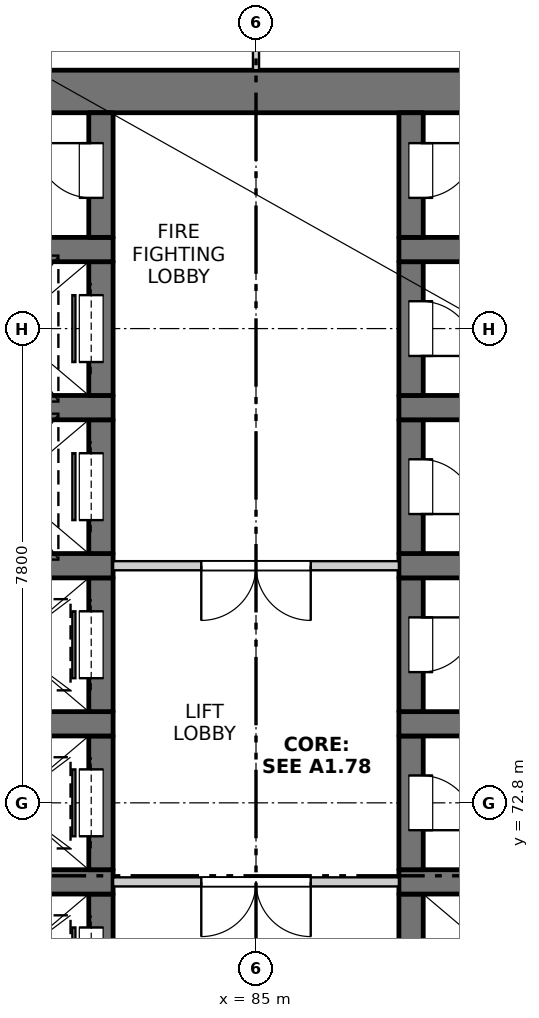
"""IFC4 building model, lengths in metres.
Left out: names, types, materials, properties, quantities, classifications, styles, units other than length and angle.
Written with IfcOpenShell. Run it as: python <this file> out.ifc"""

import sys

from ifc_helpers import new_model, si_unit, direction, frame, frame_2d, origin, place, context, subcontext, project, spatial, rectangle, extrude, element, fill, save


model = new_model("IFC4")
c1 = context("Model", 3, precision=1e-05, world=origin(), true_north=direction((0.0, 1.0)))
c2 = subcontext(c1, "Body", "Model", "MODEL_VIEW")
j1 = project(units=[si_unit("LENGTHUNIT", "METRE"), si_unit("PLANEANGLEUNIT", "RADIAN")], contexts=[c1])
p1 = place(None, origin())
s1 = spatial("IfcSite", under=j1, at=p1, CompositionType="ELEMENT")
p2 = place(p1, origin())
s2 = spatial("IfcBuilding", under=s1, at=p2, CompositionType="ELEMENT")
p3 = place(p2, frame((0.0, 0.0, 58.0)))
s3 = spatial("IfcBuildingStorey", under=s2, at=p3, CompositionType="ELEMENT", Elevation=58.0)
p4 = place(p3, frame((75.6, 84.5, -0.25), z_axis=(0.0, 0.0, 1.0), x_axis=(1.0, 0.0, 0.0)))
e1 = element("IfcWall", 1, at=p4, inside=s3, PredefinedType="SOLIDWALL", context=c2, shape_type="SweptSolid", body=[
    extrude(rectangle(XDim=18.8, YDim=0.7, at=frame_2d((9.4, 0.0))), origin(), (0.0, 0.0, 1.0), 3.4),
])
p5 = place(p3, frame((82.45, 69.1, -0.25), z_axis=(0.0, 0.0, 1.0), x_axis=(0.0, 1.0, 0.0)))
e2 = element("IfcWall", 2, at=p5, inside=s3, PredefinedType="SOLIDWALL", context=c2, shape_type="SweptSolid", body=[
    extrude(rectangle(XDim=2.2, YDim=0.4, at=frame_2d((1.1, 0.0))), origin(), (0.0, 0.0, 1.0), 3.4),
])
p6 = place(p5, frame((0.55, 0.0, 0.25)))
e3 = element("IfcOpeningElement", 3, at=p6, cuts=e2, PredefinedType="OPENING", context=c2, shape_type="SweptSolid", body=[
    extrude(rectangle(XDim=1.1, YDim=2.1, at=frame_2d((0.55, 1.05))), frame((0.0, 0.21, 0.0), z_axis=(0.0, -1.0, 0.0), x_axis=(1.0, 0.0, 0.0)), (0.0, 0.0, 1.0), 0.42),
])
p7 = place(p3, frame((79.65, 71.5, -0.25), z_axis=(0.0, 0.0, 1.0), x_axis=(1.0, 0.0, 0.0)))
e4 = element("IfcWall", 4, at=p7, inside=s3, PredefinedType="SOLIDWALL", context=c2, shape_type="SweptSolid", body=[
    extrude(rectangle(XDim=3.0, YDim=0.4, at=frame_2d((1.5, 0.0))), origin(), (0.0, 0.0, 1.0), 3.4),
])
p8 = place(p3, frame((82.45, 71.7, -0.25), z_axis=(0.0, 0.0, 1.0), x_axis=(0.0, 1.0, 0.0)))
e5 = element("IfcWall", 5, at=p8, inside=s3, PredefinedType="SOLIDWALL", context=c2, shape_type="SweptSolid", body=[
    extrude(rectangle(XDim=2.2, YDim=0.4, at=frame_2d((1.1, 0.0))), origin(), (0.0, 0.0, 1.0), 3.4),
])
p9 = place(p8, frame((0.55, 0.0, 0.25)))
e6 = element("IfcOpeningElement", 6, at=p9, cuts=e5, PredefinedType="OPENING", context=c2, shape_type="SweptSolid", body=[
    extrude(rectangle(XDim=1.1, YDim=2.1, at=frame_2d((0.55, 1.05))), frame((0.0, 0.21, 0.0), z_axis=(0.0, -1.0, 0.0), x_axis=(1.0, 0.0, 0.0)), (0.0, 0.0, 1.0), 0.42),
])
p10 = place(p3, frame((79.65, 74.1, -0.25), z_axis=(0.0, 0.0, 1.0), x_axis=(1.0, 0.0, 0.0)))
e7 = element("IfcWall", 7, at=p10, inside=s3, PredefinedType="SOLIDWALL", context=c2, shape_type="SweptSolid", body=[
    extrude(rectangle(XDim=3.0, YDim=0.4, at=frame_2d((1.5, 0.0))), origin(), (0.0, 0.0, 1.0), 3.4),
])
p11 = place(p3, frame((82.45, 74.3, -0.25), z_axis=(0.0, 0.0, 1.0), x_axis=(0.0, 1.0, 0.0)))
e8 = element("IfcWall", 8, at=p11, inside=s3, PredefinedType="SOLIDWALL", context=c2, shape_type="SweptSolid", body=[
    extrude(rectangle(XDim=2.2, YDim=0.4, at=frame_2d((1.1, 0.0))), origin(), (0.0, 0.0, 1.0), 3.4),
])
p12 = place(p11, frame((0.55, 0.0, 0.25)))
e9 = element("IfcOpeningElement", 9, at=p12, cuts=e8, PredefinedType="OPENING", context=c2, shape_type="SweptSolid", body=[
    extrude(rectangle(XDim=1.1, YDim=2.1, at=frame_2d((0.55, 1.05))), frame((0.0, 0.21, 0.0), z_axis=(0.0, -1.0, 0.0), x_axis=(1.0, 0.0, 0.0)), (0.0, 0.0, 1.0), 0.42),
])
p13 = place(p3, frame((79.65, 76.7, -0.25), z_axis=(0.0, 0.0, 1.0), x_axis=(1.0, 0.0, 0.0)))
e10 = element("IfcWall", 10, at=p13, inside=s3, PredefinedType="SOLIDWALL", context=c2, shape_type="SweptSolid", body=[
    extrude(rectangle(XDim=3.0, YDim=0.4, at=frame_2d((1.5, 0.0))), origin(), (0.0, 0.0, 1.0), 3.4),
])
p14 = place(p3, frame((82.45, 76.9, -0.25), z_axis=(0.0, 0.0, 1.0), x_axis=(0.0, 1.0, 0.0)))
e11 = element("IfcWall", 11, at=p14, inside=s3, PredefinedType="SOLIDWALL", context=c2, shape_type="SweptSolid", body=[
    extrude(rectangle(XDim=2.2, YDim=0.4, at=frame_2d((1.1, 0.0))), origin(), (0.0, 0.0, 1.0), 3.4),
])
p15 = place(p14, frame((0.55, 0.0, 0.25)))
e12 = element("IfcOpeningElement", 12, at=p15, cuts=e11, PredefinedType="OPENING", context=c2, shape_type="SweptSolid", body=[
    extrude(rectangle(XDim=1.1, YDim=2.1, at=frame_2d((0.55, 1.05))), frame((0.0, 0.21, 0.0), z_axis=(0.0, -1.0, 0.0), x_axis=(1.0, 0.0, 0.0)), (0.0, 0.0, 1.0), 0.42),
])
p16 = place(p3, frame((79.65, 79.3, -0.25), z_axis=(0.0, 0.0, 1.0), x_axis=(1.0, 0.0, 0.0)))
e13 = element("IfcWall", 13, at=p16, inside=s3, PredefinedType="SOLIDWALL", context=c2, shape_type="SweptSolid", body=[
    extrude(rectangle(XDim=3.0, YDim=0.4, at=frame_2d((1.5, 0.0))), origin(), (0.0, 0.0, 1.0), 3.4),
])
p17 = place(p3, frame((82.45, 79.5, -0.25), z_axis=(0.0, 0.0, 1.0), x_axis=(0.0, 1.0, 0.0)))
e14 = element("IfcWall", 14, at=p17, inside=s3, PredefinedType="SOLIDWALL", context=c2, shape_type="SweptSolid", body=[
    extrude(rectangle(XDim=2.2, YDim=0.4, at=frame_2d((1.1, 0.0))), origin(), (0.0, 0.0, 1.0), 3.4),
])
p18 = place(p17, frame((0.55, 0.0, 0.25)))
e15 = element("IfcOpeningElement", 15, at=p18, cuts=e14, PredefinedType="OPENING", context=c2, shape_type="SweptSolid", body=[
    extrude(rectangle(XDim=1.1, YDim=2.1, at=frame_2d((0.55, 1.05))), frame((0.0, 0.21, 0.0), z_axis=(0.0, -1.0, 0.0), x_axis=(1.0, 0.0, 0.0)), (0.0, 0.0, 1.0), 0.42),
])
p19 = place(p3, frame((79.65, 81.9, -0.25), z_axis=(0.0, 0.0, 1.0), x_axis=(1.0, 0.0, 0.0)))
e16 = element("IfcWall", 16, at=p19, inside=s3, PredefinedType="SOLIDWALL", context=c2, shape_type="SweptSolid", body=[
    extrude(rectangle(XDim=3.0, YDim=0.4, at=frame_2d((1.5, 0.0))), origin(), (0.0, 0.0, 1.0), 3.4),
])
p20 = place(p3, frame((82.45, 82.1, -0.25), z_axis=(0.0, 0.0, 1.0), x_axis=(0.0, 1.0, 0.0)))
e17 = element("IfcWall", 17, at=p20, inside=s3, PredefinedType="SOLIDWALL", context=c2, shape_type="SweptSolid", body=[
    extrude(rectangle(XDim=2.05, YDim=0.4, at=frame_2d((1.025, 0.0))), origin(), (0.0, 0.0, 1.0), 3.4),
])
p21 = place(p20, frame((0.65, 0.0, 0.25)))
e18 = element("IfcOpeningElement", 18, at=p21, cuts=e17, PredefinedType="OPENING", context=c2, shape_type="SweptSolid", body=[
    extrude(rectangle(XDim=0.9, YDim=2.1, at=frame_2d((0.45, 1.05))), frame((0.0, 0.21, 0.0), z_axis=(0.0, -1.0, 0.0), x_axis=(1.0, 0.0, 0.0)), (0.0, 0.0, 1.0), 0.42),
])
p22 = place(p3, frame((87.55, 69.1, -0.25), z_axis=(0.0, 0.0, 1.0), x_axis=(0.0, 1.0, 0.0)))
e19 = element("IfcWall", 19, at=p22, inside=s3, PredefinedType="SOLIDWALL", context=c2, shape_type="SweptSolid", body=[
    extrude(rectangle(XDim=2.2, YDim=0.4, at=frame_2d((1.1, 0.0))), origin(), (0.0, 0.0, 1.0), 3.4),
])
p23 = place(p3, frame((87.35, 71.5, -0.25), z_axis=(0.0, 0.0, 1.0), x_axis=(1.0, 0.0, 0.0)))
e20 = element("IfcWall", 20, at=p23, inside=s3, PredefinedType="SOLIDWALL", context=c2, shape_type="SweptSolid", body=[
    extrude(rectangle(XDim=3.0, YDim=0.4, at=frame_2d((1.5, 0.0))), origin(), (0.0, 0.0, 1.0), 3.4),
])
p24 = place(p3, frame((87.55, 71.7, -0.25), z_axis=(0.0, 0.0, 1.0), x_axis=(0.0, 1.0, 0.0)))
e21 = element("IfcWall", 21, at=p24, inside=s3, PredefinedType="SOLIDWALL", context=c2, shape_type="SweptSolid", body=[
    extrude(rectangle(XDim=2.2, YDim=0.4, at=frame_2d((1.1, 0.0))), origin(), (0.0, 0.0, 1.0), 3.4),
])
p25 = place(p24, frame((0.65, 0.0, 0.25)))
e22 = element("IfcOpeningElement", 22, at=p25, cuts=e21, PredefinedType="OPENING", context=c2, shape_type="SweptSolid", body=[
    extrude(rectangle(XDim=0.9, YDim=2.1, at=frame_2d((0.45, 1.05))), frame((0.0, 0.21, 0.0), z_axis=(0.0, -1.0, 0.0), x_axis=(1.0, 0.0, 0.0)), (0.0, 0.0, 1.0), 0.42),
])
p26 = place(p3, frame((87.35, 74.1, -0.25), z_axis=(0.0, 0.0, 1.0), x_axis=(1.0, 0.0, 0.0)))
e23 = element("IfcWall", 23, at=p26, inside=s3, PredefinedType="SOLIDWALL", context=c2, shape_type="SweptSolid", body=[
    extrude(rectangle(XDim=3.0, YDim=0.4, at=frame_2d((1.5, 0.0))), origin(), (0.0, 0.0, 1.0), 3.4),
])
p27 = place(p3, frame((87.55, 74.3, -0.25), z_axis=(0.0, 0.0, 1.0), x_axis=(0.0, 1.0, 0.0)))
e24 = element("IfcWall", 24, at=p27, inside=s3, PredefinedType="SOLIDWALL", context=c2, shape_type="SweptSolid", body=[
    extrude(rectangle(XDim=2.2, YDim=0.4, at=frame_2d((1.1, 0.0))), origin(), (0.0, 0.0, 1.0), 3.4),
])
p28 = place(p27, frame((0.65, 0.0, 0.25)))
e25 = element("IfcOpeningElement", 25, at=p28, cuts=e24, PredefinedType="OPENING", context=c2, shape_type="SweptSolid", body=[
    extrude(rectangle(XDim=0.9, YDim=2.1, at=frame_2d((0.45, 1.05))), frame((0.0, 0.21, 0.0), z_axis=(0.0, -1.0, 0.0), x_axis=(1.0, 0.0, 0.0)), (0.0, 0.0, 1.0), 0.42),
])
p29 = place(p3, frame((87.35, 76.7, -0.25), z_axis=(0.0, 0.0, 1.0), x_axis=(1.0, 0.0, 0.0)))
e26 = element("IfcWall", 26, at=p29, inside=s3, PredefinedType="SOLIDWALL", context=c2, shape_type="SweptSolid", body=[
    extrude(rectangle(XDim=3.0, YDim=0.4, at=frame_2d((1.5, 0.0))), origin(), (0.0, 0.0, 1.0), 3.4),
])
p30 = place(p3, frame((87.55, 76.9, -0.25), z_axis=(0.0, 0.0, 1.0), x_axis=(0.0, 1.0, 0.0)))
e27 = element("IfcWall", 27, at=p30, inside=s3, PredefinedType="SOLIDWALL", context=c2, shape_type="SweptSolid", body=[
    extrude(rectangle(XDim=2.2, YDim=0.4, at=frame_2d((1.1, 0.0))), origin(), (0.0, 0.0, 1.0), 3.4),
])
p31 = place(p30, frame((0.65, 0.0, 0.25)))
e28 = element("IfcOpeningElement", 28, at=p31, cuts=e27, PredefinedType="OPENING", context=c2, shape_type="SweptSolid", body=[
    extrude(rectangle(XDim=0.9, YDim=2.1, at=frame_2d((0.45, 1.05))), frame((0.0, 0.21, 0.0), z_axis=(0.0, -1.0, 0.0), x_axis=(1.0, 0.0, 0.0)), (0.0, 0.0, 1.0), 0.42),
])
p32 = place(p3, frame((87.35, 79.3, -0.25), z_axis=(0.0, 0.0, 1.0), x_axis=(1.0, 0.0, 0.0)))
e29 = element("IfcWall", 29, at=p32, inside=s3, PredefinedType="SOLIDWALL", context=c2, shape_type="SweptSolid", body=[
    extrude(rectangle(XDim=3.0, YDim=0.4, at=frame_2d((1.5, 0.0))), origin(), (0.0, 0.0, 1.0), 3.4),
])
p33 = place(p3, frame((87.55, 79.5, -0.25), z_axis=(0.0, 0.0, 1.0), x_axis=(0.0, 1.0, 0.0)))
e30 = element("IfcWall", 30, at=p33, inside=s3, PredefinedType="SOLIDWALL", context=c2, shape_type="SweptSolid", body=[
    extrude(rectangle(XDim=2.2, YDim=0.4, at=frame_2d((1.1, 0.0))), origin(), (0.0, 0.0, 1.0), 3.4),
])
p34 = place(p33, frame((0.65, 0.0, 0.25)))
e31 = element("IfcOpeningElement", 31, at=p34, cuts=e30, PredefinedType="OPENING", context=c2, shape_type="SweptSolid", body=[
    extrude(rectangle(XDim=0.9, YDim=2.1, at=frame_2d((0.45, 1.05))), frame((0.0, 0.21, 0.0), z_axis=(0.0, -1.0, 0.0), x_axis=(1.0, 0.0, 0.0)), (0.0, 0.0, 1.0), 0.42),
])
p35 = place(p3, frame((87.35, 81.9, -0.25), z_axis=(0.0, 0.0, 1.0), x_axis=(1.0, 0.0, 0.0)))
e32 = element("IfcWall", 32, at=p35, inside=s3, PredefinedType="SOLIDWALL", context=c2, shape_type="SweptSolid", body=[
    extrude(rectangle(XDim=3.0, YDim=0.4, at=frame_2d((1.5, 0.0))), origin(), (0.0, 0.0, 1.0), 3.4),
])
p36 = place(p3, frame((87.55, 82.1, -0.25), z_axis=(0.0, 0.0, 1.0), x_axis=(0.0, 1.0, 0.0)))
e33 = element("IfcWall", 33, at=p36, inside=s3, PredefinedType="SOLIDWALL", context=c2, shape_type="SweptSolid", body=[
    extrude(rectangle(XDim=2.05, YDim=0.4, at=frame_2d((1.025, 0.0))), origin(), (0.0, 0.0, 1.0), 3.4),
])
p37 = place(p36, frame((0.65, 0.0, 0.25)))
e34 = element("IfcOpeningElement", 34, at=p37, cuts=e33, PredefinedType="OPENING", context=c2, shape_type="SweptSolid", body=[
    extrude(rectangle(XDim=0.9, YDim=2.1, at=frame_2d((0.45, 1.05))), frame((0.0, 0.21, 0.0), z_axis=(0.0, -1.0, 0.0), x_axis=(1.0, 0.0, 0.0)), (0.0, 0.0, 1.0), 0.42),
])
p38 = place(p3, frame((82.65, 71.5, 0.0), z_axis=(0.0, 0.0, 1.0), x_axis=(1.0, 0.0, 0.0)))
e35 = element("IfcWall", 35, at=p38, inside=s3, PredefinedType="PARTITIONING", context=c2, shape_type="SweptSolid", body=[
    extrude(rectangle(XDim=4.7, YDim=0.15, at=frame_2d((2.35, 0.0))), origin(), (0.0, 0.0, 1.0), 3.15),
])
p39 = place(p38, frame((1.45, 0.0, 0.0)))
e36 = element("IfcOpeningElement", 36, at=p39, cuts=e35, PredefinedType="OPENING", context=c2, shape_type="SweptSolid", body=[
    extrude(rectangle(XDim=1.8, YDim=2.1, at=frame_2d((0.9, 1.05))), frame((0.0, 0.085, 0.0), z_axis=(0.0, -1.0, 0.0), x_axis=(1.0, 0.0, 0.0)), (0.0, 0.0, 1.0), 0.17),
])
p40 = place(p3, frame((82.65, 76.7, 0.0), z_axis=(0.0, 0.0, 1.0), x_axis=(1.0, 0.0, 0.0)))
e37 = element("IfcWall", 37, at=p40, inside=s3, PredefinedType="PARTITIONING", context=c2, shape_type="SweptSolid", body=[
    extrude(rectangle(XDim=4.7, YDim=0.15, at=frame_2d((2.35, 0.0))), origin(), (0.0, 0.0, 1.0), 3.15),
])
p41 = place(p40, frame((1.45, 0.0, 0.0)))
e38 = element("IfcOpeningElement", 38, at=p41, cuts=e37, PredefinedType="OPENING", context=c2, shape_type="SweptSolid", body=[
    extrude(rectangle(XDim=1.8, YDim=2.1, at=frame_2d((0.9, 1.05))), frame((0.0, 0.085, 0.0), z_axis=(0.0, -1.0, 0.0), x_axis=(1.0, 0.0, 0.0)), (0.0, 0.0, 1.0), 0.17),
])
p42 = place(p3, frame((85.0, 84.85, 0.0), z_axis=(0.0, 0.0, 1.0), x_axis=(0.0, 1.0, 0.0)))
e39 = element("IfcWall", 39, at=p42, inside=s3, PredefinedType="PARTITIONING", context=c2, shape_type="SweptSolid", body=[
    extrude(rectangle(XDim=3.25, YDim=0.1, at=frame_2d((1.625, 0.0))), origin(), (0.0, 0.0, 1.0), 3.15),
])
p43 = place(p42, frame((1.15, 0.0, 0.0)))
e40 = element("IfcOpeningElement", 40, at=p43, cuts=e39, PredefinedType="OPENING", context=c2, shape_type="SweptSolid", body=[
    extrude(rectangle(XDim=0.9, YDim=2.1, at=frame_2d((0.45, 1.05))), frame((0.0, 0.06, 0.0), z_axis=(0.0, -1.0, 0.0), x_axis=(1.0, 0.0, 0.0)), (0.0, 0.0, 1.0), 0.12),
])
p44 = place(p6, origin())
e41 = element("IfcDoor", 41, at=p44, inside=s3, OperationType="SLIDING_TO_LEFT", PredefinedType="DOOR", context=c2, shape_type="SweptSolid", body=[
    extrude(rectangle(XDim=1.1, YDim=2.1, at=frame_2d((0.55, 1.05))), frame((0.0, 0.185, 0.0), z_axis=(0.0, -1.0, 0.0), x_axis=(1.0, 0.0, 0.0)), (0.0, 0.0, 1.0), 0.05),
])
fill(e3, e41)
p45 = place(p39, origin())
e42 = element("IfcDoor", 42, at=p45, inside=s3, OperationType="DOUBLE_DOOR_SINGLE_SWING", PredefinedType="DOOR", context=c2, shape_type="SweptSolid", body=[
    extrude(rectangle(XDim=1.8, YDim=2.1, at=frame_2d((0.9, 1.05))), frame((0.0, 0.025, 0.0), z_axis=(0.0, -1.0, 0.0), x_axis=(1.0, 0.0, 0.0)), (0.0, 0.0, 1.0), 0.05),
])
fill(e36, e42)
p46 = place(p9, origin())
e43 = element("IfcDoor", 43, at=p46, inside=s3, OperationType="SLIDING_TO_LEFT", PredefinedType="DOOR", context=c2, shape_type="SweptSolid", body=[
    extrude(rectangle(XDim=1.1, YDim=2.1, at=frame_2d((0.55, 1.05))), frame((0.0, 0.185, 0.0), z_axis=(0.0, -1.0, 0.0), x_axis=(1.0, 0.0, 0.0)), (0.0, 0.0, 1.0), 0.05),
])
fill(e6, e43)
p47 = place(p25, origin())
e44 = element("IfcDoor", 44, at=p47, inside=s3, OperationType="SINGLE_SWING_RIGHT", PredefinedType="DOOR", context=c2, shape_type="SweptSolid", body=[
    extrude(rectangle(XDim=0.9, YDim=2.1, at=frame_2d((0.45, 1.05))), frame((0.0, -0.135, 0.0), z_axis=(0.0, -1.0, 0.0), x_axis=(1.0, 0.0, 0.0)), (0.0, 0.0, 1.0), 0.05),
])
fill(e22, e44)
p48 = place(p12, origin())
e45 = element("IfcDoor", 45, at=p48, inside=s3, OperationType="SLIDING_TO_LEFT", PredefinedType="DOOR", context=c2, shape_type="SweptSolid", body=[
    extrude(rectangle(XDim=1.1, YDim=2.1, at=frame_2d((0.55, 1.05))), frame((0.0, 0.185, 0.0), z_axis=(0.0, -1.0, 0.0), x_axis=(1.0, 0.0, 0.0)), (0.0, 0.0, 1.0), 0.05),
])
fill(e9, e45)
p49 = place(p28, origin())
e46 = element("IfcDoor", 46, at=p49, inside=s3, OperationType="SINGLE_SWING_LEFT", PredefinedType="DOOR", context=c2, shape_type="SweptSolid", body=[
    extrude(rectangle(XDim=0.9, YDim=2.1, at=frame_2d((0.45, 1.05))), frame((0.0, -0.135, 0.0), z_axis=(0.0, -1.0, 0.0), x_axis=(1.0, 0.0, 0.0)), (0.0, 0.0, 1.0), 0.05),
])
fill(e25, e46)
p50 = place(p41, origin())
e47 = element("IfcDoor", 47, at=p50, inside=s3, OperationType="DOUBLE_DOOR_SINGLE_SWING", PredefinedType="DOOR", context=c2, shape_type="SweptSolid", body=[
    extrude(rectangle(XDim=1.8, YDim=2.1, at=frame_2d((0.9, 1.05))), frame((0.0, 0.025, 0.0), z_axis=(0.0, -1.0, 0.0), x_axis=(1.0, 0.0, 0.0)), (0.0, 0.0, 1.0), 0.05),
])
fill(e38, e47)
p51 = place(p15, origin())
e48 = element("IfcDoor", 48, at=p51, inside=s3, OperationType="SLIDING_TO_LEFT", PredefinedType="DOOR", context=c2, shape_type="SweptSolid", body=[
    extrude(rectangle(XDim=1.1, YDim=2.1, at=frame_2d((0.55, 1.05))), frame((0.0, 0.185, 0.0), z_axis=(0.0, -1.0, 0.0), x_axis=(1.0, 0.0, 0.0)), (0.0, 0.0, 1.0), 0.05),
])
fill(e12, e48)
p52 = place(p31, origin())
e49 = element("IfcDoor", 49, at=p52, inside=s3, OperationType="SINGLE_SWING_RIGHT", PredefinedType="DOOR", context=c2, shape_type="SweptSolid", body=[
    extrude(rectangle(XDim=0.9, YDim=2.1, at=frame_2d((0.45, 1.05))), frame((0.0, -0.135, 0.0), z_axis=(0.0, -1.0, 0.0), x_axis=(1.0, 0.0, 0.0)), (0.0, 0.0, 1.0), 0.05),
])
fill(e28, e49)
p53 = place(p18, origin())
e50 = element("IfcDoor", 50, at=p53, inside=s3, OperationType="SLIDING_TO_LEFT", PredefinedType="DOOR", context=c2, shape_type="SweptSolid", body=[
    extrude(rectangle(XDim=1.1, YDim=2.1, at=frame_2d((0.55, 1.05))), frame((0.0, 0.185, 0.0), z_axis=(0.0, -1.0, 0.0), x_axis=(1.0, 0.0, 0.0)), (0.0, 0.0, 1.0), 0.05),
])
fill(e15, e50)
p54 = place(p34, origin())
e51 = element("IfcDoor", 51, at=p54, inside=s3, OperationType="SINGLE_SWING_RIGHT", PredefinedType="DOOR", context=c2, shape_type="SweptSolid", body=[
    extrude(rectangle(XDim=0.9, YDim=2.1, at=frame_2d((0.45, 1.05))), frame((0.0, -0.135, 0.0), z_axis=(0.0, -1.0, 0.0), x_axis=(1.0, 0.0, 0.0)), (0.0, 0.0, 1.0), 0.05),
])
fill(e31, e51)
p55 = place(p21, origin())
e52 = element("IfcDoor", 52, at=p55, inside=s3, OperationType="SINGLE_SWING_RIGHT", PredefinedType="DOOR", context=c2, shape_type="SweptSolid", body=[
    extrude(rectangle(XDim=0.9, YDim=2.1, at=frame_2d((0.45, 1.05))), frame((0.0, 0.185, 0.0), z_axis=(0.0, -1.0, 0.0), x_axis=(1.0, 0.0, 0.0)), (0.0, 0.0, 1.0), 0.05),
])
fill(e18, e52)
p56 = place(p37, origin())
e53 = element("IfcDoor", 53, at=p56, inside=s3, OperationType="SINGLE_SWING_LEFT", PredefinedType="DOOR", context=c2, shape_type="SweptSolid", body=[
    extrude(rectangle(XDim=0.9, YDim=2.1, at=frame_2d((0.45, 1.05))), frame((0.0, -0.135, 0.0), z_axis=(0.0, -1.0, 0.0), x_axis=(1.0, 0.0, 0.0)), (0.0, 0.0, 1.0), 0.05),
])
fill(e34, e53)
save(model, sys.argv[1])
